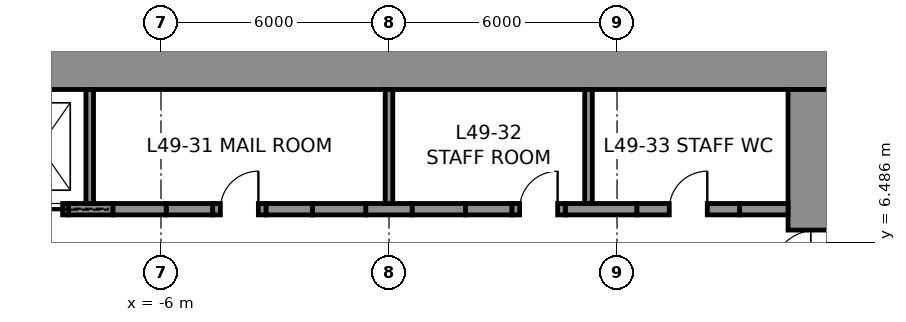
"""IFC4 building model, lengths in metres.
Left out: names, types, materials, properties, quantities, classifications, styles, units other than length and angle.
Written with IfcOpenShell. Run it as: python <this file> out.ifc"""

import sys

from ifc_helpers import new_model, si_unit, direction, frame, frame_2d, origin, place, context, subcontext, project, spatial, rectangle, extrude, element, fill, save


model = new_model("IFC4")
c1 = context("Model", 3, precision=1e-05, world=origin(), true_north=direction((0.0, 1.0)))
c2 = subcontext(c1, "Body", "Model", "MODEL_VIEW")
j1 = project(units=[si_unit("LENGTHUNIT", "METRE"), si_unit("PLANEANGLEUNIT", "RADIAN")], contexts=[c1])
p1 = place(None, origin())
s1 = spatial("IfcSite", under=j1, at=p1, CompositionType="ELEMENT")
p2 = place(p1, origin())
s2 = spatial("IfcBuilding", under=s1, at=p2, CompositionType="ELEMENT")
p3 = place(p2, frame((0.0, 0.0, 225.8)))
s3 = spatial("IfcBuildingStorey", under=s2, at=p3, CompositionType="ELEMENT", Elevation=225.8)
p4 = place(p3, frame((-12.0, 11.25, 0.0), z_axis=(0.0, 0.0, 1.0), x_axis=(1.0, 0.0, 0.0)))
e1 = element("IfcWall", 1, at=p4, inside=s3, PredefinedType="SHEAR", context=c2, shape_type="SweptSolid", body=[
    extrude(rectangle(XDim=24.0, YDim=1.5, at=frame_2d((12.0, 0.0))), origin(), (0.0, 0.0, 1.0), 4.0),
])
p5 = place(p3, frame((11.25, 10.5, 0.0), z_axis=(0.0, 0.0, 1.0), x_axis=(0.0, -1.0, 0.0)))
e2 = element("IfcWall", 2, at=p5, inside=s3, PredefinedType="SHEAR", context=c2, shape_type="SweptSolid", body=[
    extrude(rectangle(XDim=21.0, YDim=1.5, at=frame_2d((10.5, 0.0))), origin(), (0.0, 0.0, 1.0), 4.0),
])
p6 = place(p5, frame((3.7, 0.0, 0.0)))
e3 = element("IfcOpeningElement", 3, at=p6, cuts=e2, PredefinedType="OPENING", context=c2, shape_type="SweptSolid", body=[
    extrude(rectangle(XDim=1.2, YDim=2.3, at=frame_2d((0.6, 1.15))), frame((0.0, 0.76, 0.0), z_axis=(0.0, -1.0, 0.0), x_axis=(1.0, 0.0, 0.0)), (0.0, 0.0, 1.0), 1.52),
])
p7 = place(p5, frame((16.1, 0.0, 0.0)))
e4 = element("IfcOpeningElement", 4, at=p7, cuts=e2, PredefinedType="OPENING", context=c2, shape_type="SweptSolid", body=[
    extrude(rectangle(XDim=1.2, YDim=2.3, at=frame_2d((0.6, 1.15))), frame((0.0, 0.76, 0.0), z_axis=(0.0, -1.0, 0.0), x_axis=(1.0, 0.0, 0.0)), (0.0, 0.0, 1.0), 1.52),
])
p8 = place(p3, frame((-8.438, 7.35, 0.0), z_axis=(0.0, 0.0, 1.0), x_axis=(1.0, 0.0, 0.0)))
e5 = element("IfcWall", 5, at=p8, inside=s3, PredefinedType="SHEAR", context=c2, shape_type="SweptSolid", body=[
    extrude(rectangle(XDim=1.175, YDim=0.3, at=frame_2d((0.587, 0.0))), origin(), (0.0, 0.0, 1.0), 4.0),
])
for number, where, z_axis, x_axis in (
    (6, (-5.863, 7.35, 0.0), (0.0, 0.0, 1.0), (1.0, 0.0, 0.0)),
    (7, (-3.238, 7.35, 0.0), (0.0, 0.0, 1.0), (1.0, 0.0, 0.0)),
    (8, (-0.613, 7.35, 0.0), (0.0, 0.0, 1.0), (1.0, 0.0, 0.0)),
    (9, (2.012, 7.35, 0.0), (0.0, 0.0, 1.0), (1.0, 0.0, 0.0)),
):
    element("IfcWall", number, at=place(p3, frame(where, z_axis=z_axis, x_axis=x_axis)), inside=s3, PredefinedType="SHEAR", context=c2, shape_type="SweptSolid", body=[
        extrude(rectangle(XDim=1.225, YDim=0.3, at=frame_2d((0.613, 0.0))), origin(), (0.0, 0.0, 1.0), 4.0),
    ])
p9 = place(p3, frame((4.637, 7.35, 0.0), z_axis=(0.0, 0.0, 1.0), x_axis=(1.0, 0.0, 0.0)))
e10 = element("IfcWall", 10, at=p9, inside=s3, PredefinedType="SHEAR", context=c2, shape_type="SweptSolid", body=[
    extrude(rectangle(XDim=1.887, YDim=0.3, at=frame_2d((0.944, 0.0))), origin(), (0.0, 0.0, 1.0), 4.0),
])
p10 = place(p3, frame((9.225, 7.35, 0.0), z_axis=(0.0, 0.0, 1.0), x_axis=(1.0, 0.0, 0.0)))
e11 = element("IfcWall", 11, at=p10, inside=s3, PredefinedType="SHEAR", context=c2, shape_type="SweptSolid", body=[
    extrude(rectangle(XDim=1.275, YDim=0.3, at=frame_2d((0.637, 0.0))), origin(), (0.0, 0.0, 1.0), 4.0),
])
p11 = place(p3, frame((-9.938, 7.35, 0.0), z_axis=(0.0, 0.0, 1.0), x_axis=(1.0, 0.0, 0.0)))
e12 = element("IfcWall", 12, at=p11, inside=s3, PredefinedType="PARTITIONING", context=c2, shape_type="SweptSolid", body=[
    extrude(rectangle(XDim=1.5, YDim=0.3, at=frame_2d((0.75, 0.0))), origin(), (0.0, 0.0, 1.0), 4.0),
])
p12 = place(p11, frame((0.15, 0.0, 0.0)))
e13 = element("IfcOpeningElement", 13, at=p12, cuts=e12, PredefinedType="OPENING", context=c2, shape_type="SweptSolid", body=[
    extrude(rectangle(XDim=1.2, YDim=2.3, at=frame_2d((0.6, 1.15))), frame((0.0, 0.16, 0.0), z_axis=(0.0, -1.0, 0.0), x_axis=(1.0, 0.0, 0.0)), (0.0, 0.0, 1.0), 0.32),
])
p13 = place(p3, frame((-7.262, 7.35, 0.0), z_axis=(0.0, 0.0, 1.0), x_axis=(1.0, 0.0, 0.0)))
e14 = element("IfcWall", 14, at=p13, inside=s3, PredefinedType="PARTITIONING", context=c2, shape_type="SweptSolid", body=[
    extrude(rectangle(XDim=1.4, YDim=0.3, at=frame_2d((0.7, 0.0))), origin(), (0.0, 0.0, 1.0), 4.0),
])
p14 = place(p3, frame((-4.637, 7.35, 0.0), z_axis=(0.0, 0.0, 1.0), x_axis=(1.0, 0.0, 0.0)))
e15 = element("IfcWall", 15, at=p14, inside=s3, PredefinedType="PARTITIONING", context=c2, shape_type="SweptSolid", body=[
    extrude(rectangle(XDim=1.4, YDim=0.3, at=frame_2d((0.7, 0.0))), origin(), (0.0, 0.0, 1.0), 4.0),
])
p15 = place(p14, frame((0.2, 0.0, 0.0)))
e16 = element("IfcOpeningElement", 16, at=p15, cuts=e15, PredefinedType="OPENING", context=c2, shape_type="SweptSolid", body=[
    extrude(rectangle(XDim=1.0, YDim=2.3, at=frame_2d((0.5, 1.15))), frame((0.0, 0.16, 0.0), z_axis=(0.0, -1.0, 0.0), x_axis=(1.0, 0.0, 0.0)), (0.0, 0.0, 1.0), 0.32),
])
for number, where, z_axis, x_axis in (
    (17, (-2.012, 7.35, 0.0), (0.0, 0.0, 1.0), (1.0, 0.0, 0.0)),
    (18, (0.613, 7.35, 0.0), (0.0, 0.0, 1.0), (1.0, 0.0, 0.0)),
):
    element("IfcWall", number, at=place(p3, frame(where, z_axis=z_axis, x_axis=x_axis)), inside=s3, PredefinedType="PARTITIONING", context=c2, shape_type="SweptSolid", body=[
        extrude(rectangle(XDim=1.4, YDim=0.3, at=frame_2d((0.7, 0.0))), origin(), (0.0, 0.0, 1.0), 4.0),
    ])
p16 = place(p3, frame((3.238, 7.35, 0.0), z_axis=(0.0, 0.0, 1.0), x_axis=(1.0, 0.0, 0.0)))
e19 = element("IfcWall", 19, at=p16, inside=s3, PredefinedType="PARTITIONING", context=c2, shape_type="SweptSolid", body=[
    extrude(rectangle(XDim=1.4, YDim=0.3, at=frame_2d((0.7, 0.0))), origin(), (0.0, 0.0, 1.0), 4.0),
])
p17 = place(p16, frame((0.2, 0.0, 0.0)))
e20 = element("IfcOpeningElement", 20, at=p17, cuts=e19, PredefinedType="OPENING", context=c2, shape_type="SweptSolid", body=[
    extrude(rectangle(XDim=1.0, YDim=2.3, at=frame_2d((0.5, 1.15))), frame((0.0, 0.16, 0.0), z_axis=(0.0, -1.0, 0.0), x_axis=(1.0, 0.0, 0.0)), (0.0, 0.0, 1.0), 0.32),
])
p18 = place(p3, frame((6.525, 7.35, 0.0), z_axis=(0.0, 0.0, 1.0), x_axis=(1.0, 0.0, 0.0)))
e21 = element("IfcWall", 21, at=p18, inside=s3, PredefinedType="PARTITIONING", context=c2, shape_type="SweptSolid", body=[
    extrude(rectangle(XDim=2.7, YDim=0.3, at=frame_2d((1.35, 0.0))), origin(), (0.0, 0.0, 1.0), 4.0),
])
p19 = place(p18, frame((0.85, 0.0, 0.0)))
e22 = element("IfcOpeningElement", 22, at=p19, cuts=e21, PredefinedType="OPENING", context=c2, shape_type="SweptSolid", body=[
    extrude(rectangle(XDim=1.0, YDim=2.3, at=frame_2d((0.5, 1.15))), frame((0.0, 0.16, 0.0), z_axis=(0.0, -1.0, 0.0), x_axis=(1.0, 0.0, 0.0)), (0.0, 0.0, 1.0), 0.32),
])
for number, where, z_axis, x_axis in (
    (23, (-7.875, 7.5, 0.0), (0.0, 0.0, 1.0), (0.0, 1.0, 0.0)),
    (24, (0.0, 7.5, 0.0), (0.0, 0.0, 1.0), (0.0, 1.0, 0.0)),
    (25, (5.25, 7.5, 0.0), (0.0, 0.0, 1.0), (0.0, 1.0, 0.0)),
):
    element("IfcWall", number, at=place(p3, frame(where, z_axis=z_axis, x_axis=x_axis)), inside=s3, PredefinedType="PARTITIONING", context=c2, shape_type="SweptSolid", body=[
        extrude(rectangle(XDim=3.0, YDim=0.2, at=frame_2d((1.5, 0.0))), origin(), (0.0, 0.0, 1.0), 4.0),
    ])
p20 = place(p15, origin())
e26 = element("IfcDoor", 26, at=p20, inside=s3, OperationType="SINGLE_SWING_RIGHT", PredefinedType="DOOR", context=c2, shape_type="SweptSolid", body=[
    extrude(rectangle(XDim=1.0, YDim=2.3, at=frame_2d((0.5, 1.15))), frame((0.0, 0.025, 0.0), z_axis=(0.0, -1.0, 0.0), x_axis=(1.0, 0.0, 0.0)), (0.0, 0.0, 1.0), 0.05),
])
fill(e16, e26)
p21 = place(p17, origin())
e27 = element("IfcDoor", 27, at=p21, inside=s3, OperationType="SINGLE_SWING_RIGHT", PredefinedType="DOOR", context=c2, shape_type="SweptSolid", body=[
    extrude(rectangle(XDim=1.0, YDim=2.3, at=frame_2d((0.5, 1.15))), frame((0.0, 0.025, 0.0), z_axis=(0.0, -1.0, 0.0), x_axis=(1.0, 0.0, 0.0)), (0.0, 0.0, 1.0), 0.05),
])
fill(e20, e27)
p22 = place(p19, origin())
e28 = element("IfcDoor", 28, at=p22, inside=s3, OperationType="SINGLE_SWING_RIGHT", PredefinedType="DOOR", context=c2, shape_type="SweptSolid", body=[
    extrude(rectangle(XDim=1.0, YDim=2.3, at=frame_2d((0.5, 1.15))), frame((0.0, 0.025, 0.0), z_axis=(0.0, -1.0, 0.0), x_axis=(1.0, 0.0, 0.0)), (0.0, 0.0, 1.0), 0.05),
])
fill(e22, e28)
p23 = place(p6, frame((1.2, 0.0, 0.0), z_axis=(0.0, 0.0, 1.0), x_axis=(-1.0, 0.0, 0.0)))
e29 = element("IfcDoor", 29, at=p23, inside=s3, OperationType="SINGLE_SWING_LEFT", PredefinedType="DOOR", context=c2, shape_type="SweptSolid", body=[
    extrude(rectangle(XDim=1.2, YDim=2.3, at=frame_2d((0.6, 1.15))), frame((0.0, 0.025, 0.0), z_axis=(0.0, -1.0, 0.0), x_axis=(1.0, 0.0, 0.0)), (0.0, 0.0, 1.0), 0.05),
])
fill(e3, e29)
p24 = place(p12, frame((1.2, 0.0, 0.0), z_axis=(0.0, 0.0, 1.0), x_axis=(-1.0, 0.0, 0.0)))
e30 = element("IfcDoor", 30, at=p24, inside=s3, OperationType="SLIDING_TO_LEFT", PredefinedType="DOOR", context=c2, shape_type="SweptSolid", body=[
    extrude(rectangle(XDim=1.2, YDim=2.3, at=frame_2d((0.6, 1.15))), frame((0.0, 0.025, 0.0), z_axis=(0.0, -1.0, 0.0), x_axis=(1.0, 0.0, 0.0)), (0.0, 0.0, 1.0), 0.05),
])
fill(e13, e30)
save(model, sys.argv[1])
